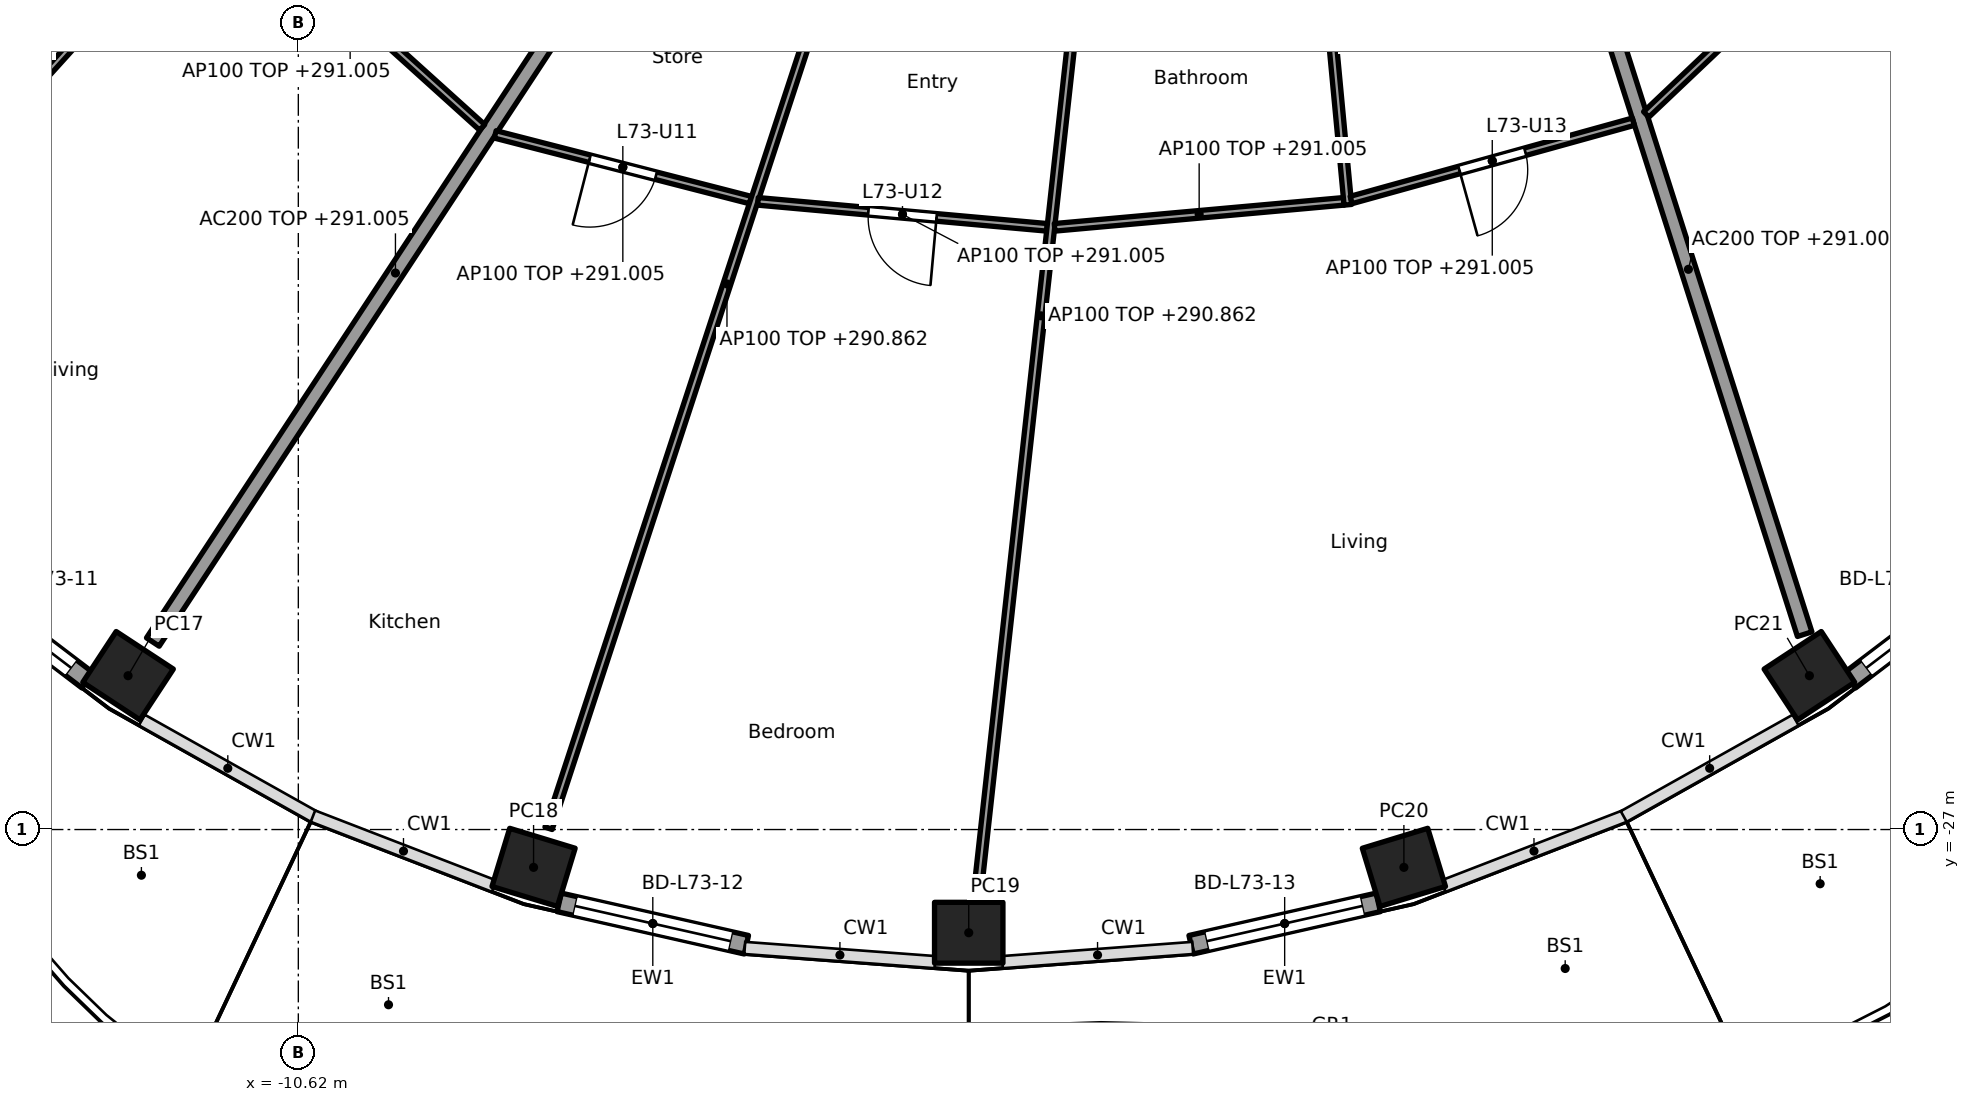
"""IFC4 building model, lengths in metres.
Left out: names, types, materials, properties, quantities, classifications, styles, units other than length and angle.
Written with IfcOpenShell. Run it as: python <this file> out.ifc"""

import sys

from ifc_helpers import new_model, si_unit, direction, frame, frame_2d, origin, origin_2d, place, context, subcontext, project, spatial, rectangle, hollow_rectangle, extrude, element, fill, save


model = new_model("IFC4")
c1 = context("Model", 3, precision=1e-05, world=origin(), true_north=direction((0.0, 1.0)))
c2 = subcontext(c1, "Body", "Model", "MODEL_VIEW")
j1 = project(units=[si_unit("LENGTHUNIT", "METRE"), si_unit("PLANEANGLEUNIT", "RADIAN")], contexts=[c1])
p1 = place(None, origin())
s1 = spatial("IfcSite", under=j1, at=p1, CompositionType="ELEMENT")
p2 = place(p1, origin())
s2 = spatial("IfcBuilding", under=s1, at=p2, CompositionType="ELEMENT")
p3 = place(p2, frame((0.0, 0.0, 288.1)))
s3 = spatial("IfcBuildingStorey", under=s2, at=p3, CompositionType="ELEMENT", Elevation=288.1)
for number, where, z_axis, x_axis in (
    (1, (-12.86, -24.976, 0.0), (0.0, 0.0, 1.0), (0.836, -0.549, 0.0)),
    (2, (-7.525, -27.498, 0.0), (0.0, 0.0, 1.0), (0.957, -0.292, 0.0)),
    (3, (-1.8, -28.358, 0.0), (0.0, 0.0, 1.0), (1.0, 0.0, 0.0)),
    (4, (3.925, -27.498, 0.0), (0.0, 0.0, 1.0), (0.957, 0.292, 0.0)),
    (5, (9.26, -24.976, 0.0), (0.0, 0.0, 1.0), (0.836, 0.549, 0.0)),
):
    element("IfcColumn", number, at=place(p3, frame(where, z_axis=z_axis, x_axis=x_axis)), inside=s3, PredefinedType="COLUMN", context=c2, shape_type="SweptSolid", body=[
        extrude(hollow_rectangle(XDim=0.9, YDim=0.8, WallThickness=0.028, at=origin_2d()), origin(), (0.0, 0.0, 1.0), 3.7),
    ])
p4 = place(p3, frame((-13.393, -25.037, 0.0), z_axis=(0.0, 0.0, 1.0), x_axis=(-0.796055284084, 0.605223912847, 0.0)))
e6 = element("IfcWall", 6, at=p4, inside=s3, PredefinedType="SOLIDWALL", context=c2, shape_type="SweptSolid", body=[
    extrude(rectangle(XDim=2.641, YDim=0.25, at=frame_2d((1.32, 0.0))), origin(), (0.0, 0.0, 1.0), 3.44),
])
p5 = place(p4, frame((0.27, 0.0, 0.0)))
e7 = element("IfcOpeningElement", 7, at=p5, cuts=e6, PredefinedType="OPENING", context=c2, shape_type="SweptSolid", body=[
    extrude(rectangle(XDim=2.1, YDim=2.4, at=frame_2d((1.05, 1.2))), frame((0.0, 0.135, 0.0), z_axis=(0.0, -1.0, 0.0), x_axis=(1.0, 0.0, 0.0)), (0.0, 0.0, 1.0), 0.27),
])
p6 = place(p3, frame((-4.725, -28.516, 0.0), z_axis=(0.0, 0.0, 1.0), x_axis=(-0.975319584032, 0.220797891756, 0.0)))
e8 = element("IfcWall", 8, at=p6, inside=s3, PredefinedType="SOLIDWALL", context=c2, shape_type="SweptSolid", body=[
    extrude(rectangle(XDim=2.525, YDim=0.25, at=frame_2d((1.263, 0.0))), origin(), (0.0, 0.0, 1.0), 3.44),
])
p7 = place(p6, frame((0.213, 0.0, 0.0)))
e9 = element("IfcOpeningElement", 9, at=p7, cuts=e8, PredefinedType="OPENING", context=c2, shape_type="SweptSolid", body=[
    extrude(rectangle(XDim=2.1, YDim=2.4, at=frame_2d((1.05, 1.2))), frame((0.0, 0.135, 0.0), z_axis=(0.0, -1.0, 0.0), x_axis=(1.0, 0.0, 0.0)), (0.0, 0.0, 1.0), 0.27),
])
p8 = place(p3, frame((3.588, -27.958, 0.0), z_axis=(0.0, 0.0, 1.0), x_axis=(-0.97531487046, -0.22081871175, 0.0)))
e10 = element("IfcWall", 10, at=p8, inside=s3, PredefinedType="SOLIDWALL", context=c2, shape_type="SweptSolid", body=[
    extrude(rectangle(XDim=2.525, YDim=0.25, at=frame_2d((1.263, 0.0))), origin(), (0.0, 0.0, 1.0), 3.44),
])
p9 = place(p8, frame((0.213, 0.0, 0.0)))
e11 = element("IfcOpeningElement", 11, at=p9, cuts=e10, PredefinedType="OPENING", context=c2, shape_type="SweptSolid", body=[
    extrude(rectangle(XDim=2.1, YDim=2.4, at=frame_2d((1.05, 1.2))), frame((0.0, 0.135, 0.0), z_axis=(0.0, -1.0, 0.0), x_axis=(1.0, 0.0, 0.0)), (0.0, 0.0, 1.0), 0.27),
])
p10 = place(p3, frame((11.895, -23.439, 0.0), z_axis=(0.0, 0.0, 1.0), x_axis=(-0.796055284084, -0.605223912847, 0.0)))
e12 = element("IfcWall", 12, at=p10, inside=s3, PredefinedType="SOLIDWALL", context=c2, shape_type="SweptSolid", body=[
    extrude(rectangle(XDim=2.641, YDim=0.25, at=frame_2d((1.32, 0.0))), origin(), (0.0, 0.0, 1.0), 3.44),
])
p11 = place(p10, frame((0.27, 0.0, 0.0)))
e13 = element("IfcOpeningElement", 13, at=p11, cuts=e12, PredefinedType="OPENING", context=c2, shape_type="SweptSolid", body=[
    extrude(rectangle(XDim=2.1, YDim=2.4, at=frame_2d((1.05, 1.2))), frame((0.0, 0.135, 0.0), z_axis=(0.0, -1.0, 0.0), x_axis=(1.0, 0.0, 0.0)), (0.0, 0.0, 1.0), 0.27),
])
p12 = place(p3, frame((-6.151, -14.824, 0.0), z_axis=(0.0, 0.0, 1.0), x_axis=(-0.549345577828, -0.835595258556, 0.0)))
e14 = element("IfcWall", 14, at=p12, inside=s3, PredefinedType="PARTITIONING", context=c2, shape_type="SweptSolid", body=[
    extrude(rectangle(XDim=11.62, YDim=0.2, at=frame_2d((5.81, 0.0))), origin(), (0.0, 0.0, 1.0), 2.905),
])
p13 = place(p3, frame((6.138, -14.83, 0.0), z_axis=(0.0, 0.0, 1.0), x_axis=(0.303653679037, -0.952782474234, 0.0)))
e15 = element("IfcWall", 15, at=p13, inside=s3, PredefinedType="PARTITIONING", context=c2, shape_type="SweptSolid", body=[
    extrude(rectangle(XDim=10.076, YDim=0.2, at=frame_2d((5.038, 0.0))), origin(), (0.0, 0.0, 1.0), 2.905),
])
p14 = place(p3, frame((-11.679, -14.557, 0.0), z_axis=(0.0, 0.0, 1.0), x_axis=(-0.670800011545, -0.741638284146, 0.0)))
e16 = element("IfcWall", 16, at=p14, inside=s3, PredefinedType="PARTITIONING", context=c2, shape_type="SweptSolid", body=[
    extrude(rectangle(XDim=8.068, YDim=0.1, at=frame_2d((4.034, 0.0))), origin(), (0.0, 0.0, 1.0), 2.905),
])
p15 = place(p3, frame((-11.676, -14.628, 0.0), z_axis=(0.0, 0.0, 1.0), x_axis=(0.74245829867, -0.669892285921, 0.0)))
e17 = element("IfcWall", 17, at=p15, inside=s3, PredefinedType="PARTITIONING", context=c2, shape_type="SweptSolid", body=[
    extrude(rectangle(XDim=4.68, YDim=0.1, at=frame_2d((2.34, 0.0))), origin(), (0.0, 0.0, 1.0), 2.905),
])
p16 = place(p15, frame((0.732, 0.0, 0.0)))
e18 = element("IfcOpeningElement", 18, at=p16, cuts=e17, PredefinedType="OPENING", context=c2, shape_type="SweptSolid", body=[
    extrude(rectangle(XDim=0.9, YDim=2.1, at=frame_2d((0.45, 1.05))), frame((0.0, 0.06, 0.0), z_axis=(0.0, -1.0, 0.0), x_axis=(1.0, 0.0, 0.0)), (0.0, 0.0, 1.0), 0.12),
])
p17 = place(p3, frame((-8.03, -17.854, 0.0), z_axis=(0.0, 0.0, 1.0), x_axis=(0.968441967324, -0.249239154077, 0.0)))
e19 = element("IfcWall", 19, at=p17, inside=s3, PredefinedType="PARTITIONING", context=c2, shape_type="SweptSolid", body=[
    extrude(rectangle(XDim=3.468, YDim=0.1, at=frame_2d((1.734, 0.0))), origin(), (0.0, 0.0, 1.0), 2.905),
])
p18 = place(p17, frame((1.284, 0.0, 0.0)))
e20 = element("IfcOpeningElement", 20, at=p18, cuts=e19, PredefinedType="OPENING", context=c2, shape_type="SweptSolid", body=[
    extrude(rectangle(XDim=0.9, YDim=2.1, at=frame_2d((0.45, 1.05))), frame((0.0, 0.06, 0.0), z_axis=(0.0, -1.0, 0.0), x_axis=(1.0, 0.0, 0.0)), (0.0, 0.0, 1.0), 0.12),
])
p19 = place(p3, frame((-2.633, -12.66, 0.0), z_axis=(0.0, 0.0, 1.0), x_axis=(-0.311432955908, -0.950268127412, 0.0)))
e21 = element("IfcWall", 21, at=p19, inside=s3, PredefinedType="PARTITIONING", context=c2, shape_type="SweptSolid", body=[
    extrude(rectangle(XDim=15.074, YDim=0.1, at=frame_2d((7.537, 0.0))), origin(), (0.0, 0.0, 1.0), 2.762),
])
p20 = place(p19, frame((0.829, 0.0, 0.0)))
e22 = element("IfcOpeningElement", 22, at=p20, cuts=e21, PredefinedType="OPENING", context=c2, shape_type="SweptSolid", body=[
    extrude(rectangle(XDim=0.9, YDim=2.1, at=frame_2d((0.45, 1.05))), frame((0.0, 0.06, 0.0), z_axis=(0.0, -1.0, 0.0), x_axis=(1.0, 0.0, 0.0)), (0.0, 0.0, 1.0), 0.12),
])
p21 = place(p3, frame((-4.573, -18.736, 0.0), z_axis=(0.0, 0.0, 1.0), x_axis=(0.995986472869, -0.089503887414, 0.0)))
e23 = element("IfcWall", 23, at=p21, inside=s3, PredefinedType="PARTITIONING", context=c2, shape_type="SweptSolid", body=[
    extrude(rectangle(XDim=3.819, YDim=0.1, at=frame_2d((1.909, 0.0))), origin(), (0.0, 0.0, 1.0), 2.905),
])
p22 = place(p21, frame((1.459, 0.0, 0.0)))
e24 = element("IfcOpeningElement", 24, at=p22, cuts=e23, PredefinedType="OPENING", context=c2, shape_type="SweptSolid", body=[
    extrude(rectangle(XDim=0.9, YDim=2.1, at=frame_2d((0.45, 1.05))), frame((0.0, 0.06, 0.0), z_axis=(0.0, -1.0, 0.0), x_axis=(1.0, 0.0, 0.0)), (0.0, 0.0, 1.0), 0.12),
])
p23 = place(p3, frame((-0.011, -12.664, 0.0), z_axis=(0.0, 0.0, 1.0), x_axis=(-0.109805889692, -0.993953050495, 0.0)))
e25 = element("IfcWall", 25, at=p23, inside=s3, PredefinedType="PARTITIONING", context=c2, shape_type="SweptSolid", body=[
    extrude(rectangle(XDim=15.248, YDim=0.1, at=frame_2d((7.624, 0.0))), origin(), (0.0, 0.0, 1.0), 2.762),
])
p24 = place(p23, frame((2.778, 0.0, 0.0)))
e26 = element("IfcOpeningElement", 26, at=p24, cuts=e25, PredefinedType="OPENING", context=c2, shape_type="SweptSolid", body=[
    extrude(rectangle(XDim=0.9, YDim=2.1, at=frame_2d((0.45, 1.05))), frame((0.0, 0.06, 0.0), z_axis=(0.0, -1.0, 0.0), x_axis=(1.0, 0.0, 0.0)), (0.0, 0.0, 1.0), 0.12),
])
p25 = place(p3, frame((-0.67, -19.077, 0.0), z_axis=(0.0, 0.0, 1.0), x_axis=(0.995986472869, 0.089503887414, 0.0)))
e27 = element("IfcWall", 27, at=p25, inside=s3, PredefinedType="PARTITIONING", context=c2, shape_type="SweptSolid", body=[
    extrude(rectangle(XDim=3.819, YDim=0.1, at=frame_2d((1.909, 0.0))), origin(), (0.0, 0.0, 1.0), 2.905),
])
p26 = place(p3, frame((2.612, -12.664, 0.0), z_axis=(0.0, 0.0, 1.0), x_axis=(0.093781393779, -0.995592813444, 0.0)))
e28 = element("IfcWall", 28, at=p26, inside=s3, PredefinedType="PARTITIONING", context=c2, shape_type="SweptSolid", body=[
    extrude(rectangle(XDim=6.144, YDim=0.1, at=frame_2d((3.072, 0.0))), origin(), (0.0, 0.0, 1.0), 2.762),
])
p27 = place(p26, frame((2.597, 0.0, 0.0)))
e29 = element("IfcOpeningElement", 29, at=p27, cuts=e28, PredefinedType="OPENING", context=c2, shape_type="SweptSolid", body=[
    extrude(rectangle(XDim=0.9, YDim=2.1, at=frame_2d((0.45, 1.05))), frame((0.0, 0.06, 0.0), z_axis=(0.0, -1.0, 0.0), x_axis=(1.0, 0.0, 0.0)), (0.0, 0.0, 1.0), 0.12),
])
p28 = place(p3, frame((3.231, -18.718, 0.0), z_axis=(0.0, 0.0, 1.0), x_axis=(0.963606817151, 0.267323590318, 0.0)))
e30 = element("IfcWall", 30, at=p28, inside=s3, PredefinedType="PARTITIONING", context=c2, shape_type="SweptSolid", body=[
    extrude(rectangle(XDim=3.853, YDim=0.1, at=frame_2d((1.927, 0.0))), origin(), (0.0, 0.0, 1.0), 2.905),
])
p29 = place(p28, frame((1.477, 0.0, 0.0)))
e31 = element("IfcOpeningElement", 31, at=p29, cuts=e30, PredefinedType="OPENING", context=c2, shape_type="SweptSolid", body=[
    extrude(rectangle(XDim=0.9, YDim=2.1, at=frame_2d((0.45, 1.05))), frame((0.0, 0.06, 0.0), z_axis=(0.0, -1.0, 0.0), x_axis=(1.0, 0.0, 0.0)), (0.0, 0.0, 1.0), 0.12),
])
p30 = place(p3, frame((7.113, -17.592, 0.0), z_axis=(0.0, 0.0, 1.0), x_axis=(0.725433932329, 0.688291805723, 0.0)))
e32 = element("IfcWall", 32, at=p30, inside=s3, PredefinedType="PARTITIONING", context=c2, shape_type="SweptSolid", body=[
    extrude(rectangle(XDim=4.305, YDim=0.1, at=frame_2d((2.153, 0.0))), origin(), (0.0, 0.0, 1.0), 2.905),
])
p31 = place(p3, frame((7.708, -10.198, 0.0), z_axis=(0.0, 0.0, 1.0), x_axis=(0.503839015963, -0.863797572347, 0.0)))
e33 = element("IfcWall", 33, at=p31, inside=s3, PredefinedType="PARTITIONING", context=c2, shape_type="SweptSolid", body=[
    extrude(rectangle(XDim=11.856, YDim=0.1, at=frame_2d((5.928, 0.0))), origin(), (0.0, 0.0, 1.0), 2.762),
])
p32 = place(p31, frame((2.095, 0.0, 0.0)))
e34 = element("IfcOpeningElement", 34, at=p32, cuts=e33, PredefinedType="OPENING", context=c2, shape_type="SweptSolid", body=[
    extrude(rectangle(XDim=0.9, YDim=2.1, at=frame_2d((0.45, 1.05))), frame((0.0, 0.06, 0.0), z_axis=(0.0, -1.0, 0.0), x_axis=(1.0, 0.0, 0.0)), (0.0, 0.0, 1.0), 0.12),
])
p33 = place(p31, frame((8.023, 0.0, 0.0)))
e35 = element("IfcOpeningElement", 35, at=p33, cuts=e33, PredefinedType="OPENING", context=c2, shape_type="SweptSolid", body=[
    extrude(rectangle(XDim=0.9, YDim=2.1, at=frame_2d((0.45, 1.05))), frame((0.0, 0.06, 0.0), z_axis=(0.0, -1.0, 0.0), x_axis=(1.0, 0.0, 0.0)), (0.0, 0.0, 1.0), 0.12),
])
p34 = place(p5, origin())
e36 = element("IfcDoor", 36, at=p34, inside=s3, OperationType="SLIDING_TO_LEFT", PredefinedType="DOOR", context=c2, shape_type="SweptSolid", body=[
    extrude(rectangle(XDim=2.1, YDim=2.4, at=frame_2d((1.05, 1.2))), frame((0.0, 0.025, 0.0), z_axis=(0.0, -1.0, 0.0), x_axis=(1.0, 0.0, 0.0)), (0.0, 0.0, 1.0), 0.05),
])
fill(e7, e36)
p35 = place(p7, origin())
e37 = element("IfcDoor", 37, at=p35, inside=s3, OperationType="SLIDING_TO_LEFT", PredefinedType="DOOR", context=c2, shape_type="SweptSolid", body=[
    extrude(rectangle(XDim=2.1, YDim=2.4, at=frame_2d((1.05, 1.2))), frame((0.0, 0.025, 0.0), z_axis=(0.0, -1.0, 0.0), x_axis=(1.0, 0.0, 0.0)), (0.0, 0.0, 1.0), 0.05),
])
fill(e9, e37)
p36 = place(p9, origin())
e38 = element("IfcDoor", 38, at=p36, inside=s3, OperationType="SLIDING_TO_LEFT", PredefinedType="DOOR", context=c2, shape_type="SweptSolid", body=[
    extrude(rectangle(XDim=2.1, YDim=2.4, at=frame_2d((1.05, 1.2))), frame((0.0, 0.025, 0.0), z_axis=(0.0, -1.0, 0.0), x_axis=(1.0, 0.0, 0.0)), (0.0, 0.0, 1.0), 0.05),
])
fill(e11, e38)
p37 = place(p11, origin())
e39 = element("IfcDoor", 39, at=p37, inside=s3, OperationType="SLIDING_TO_LEFT", PredefinedType="DOOR", context=c2, shape_type="SweptSolid", body=[
    extrude(rectangle(XDim=2.1, YDim=2.4, at=frame_2d((1.05, 1.2))), frame((0.0, 0.025, 0.0), z_axis=(0.0, -1.0, 0.0), x_axis=(1.0, 0.0, 0.0)), (0.0, 0.0, 1.0), 0.05),
])
fill(e13, e39)
p38 = place(p18, frame((0.9, 0.0, 0.0), x_axis=(-1.0, 0.0, 0.0)))
e40 = element("IfcDoor", 40, at=p38, inside=s3, OperationType="SINGLE_SWING_RIGHT", PredefinedType="DOOR", context=c2, shape_type="SweptSolid", body=[
    extrude(rectangle(XDim=0.9, YDim=2.1, at=frame_2d((0.45, 1.05))), frame((0.0, 0.025, 0.0), z_axis=(0.0, -1.0, 0.0), x_axis=(1.0, 0.0, 0.0)), (0.0, 0.0, 1.0), 0.05),
])
fill(e20, e40)
p39 = place(p22, frame((0.9, 0.0, 0.0), x_axis=(-1.0, 0.0, 0.0)))
e41 = element("IfcDoor", 41, at=p39, inside=s3, OperationType="SINGLE_SWING_LEFT", PredefinedType="DOOR", context=c2, shape_type="SweptSolid", body=[
    extrude(rectangle(XDim=0.9, YDim=2.1, at=frame_2d((0.45, 1.05))), frame((0.0, 0.025, 0.0), z_axis=(0.0, -1.0, 0.0), x_axis=(1.0, 0.0, 0.0)), (0.0, 0.0, 1.0), 0.05),
])
fill(e24, e41)
p40 = place(p29, frame((0.9, 0.0, 0.0), x_axis=(-1.0, 0.0, 0.0)))
e42 = element("IfcDoor", 42, at=p40, inside=s3, OperationType="SINGLE_SWING_RIGHT", PredefinedType="DOOR", context=c2, shape_type="SweptSolid", body=[
    extrude(rectangle(XDim=0.9, YDim=2.1, at=frame_2d((0.45, 1.05))), frame((0.0, 0.025, 0.0), z_axis=(0.0, -1.0, 0.0), x_axis=(1.0, 0.0, 0.0)), (0.0, 0.0, 1.0), 0.05),
])
fill(e31, e42)
save(model, sys.argv[1])
